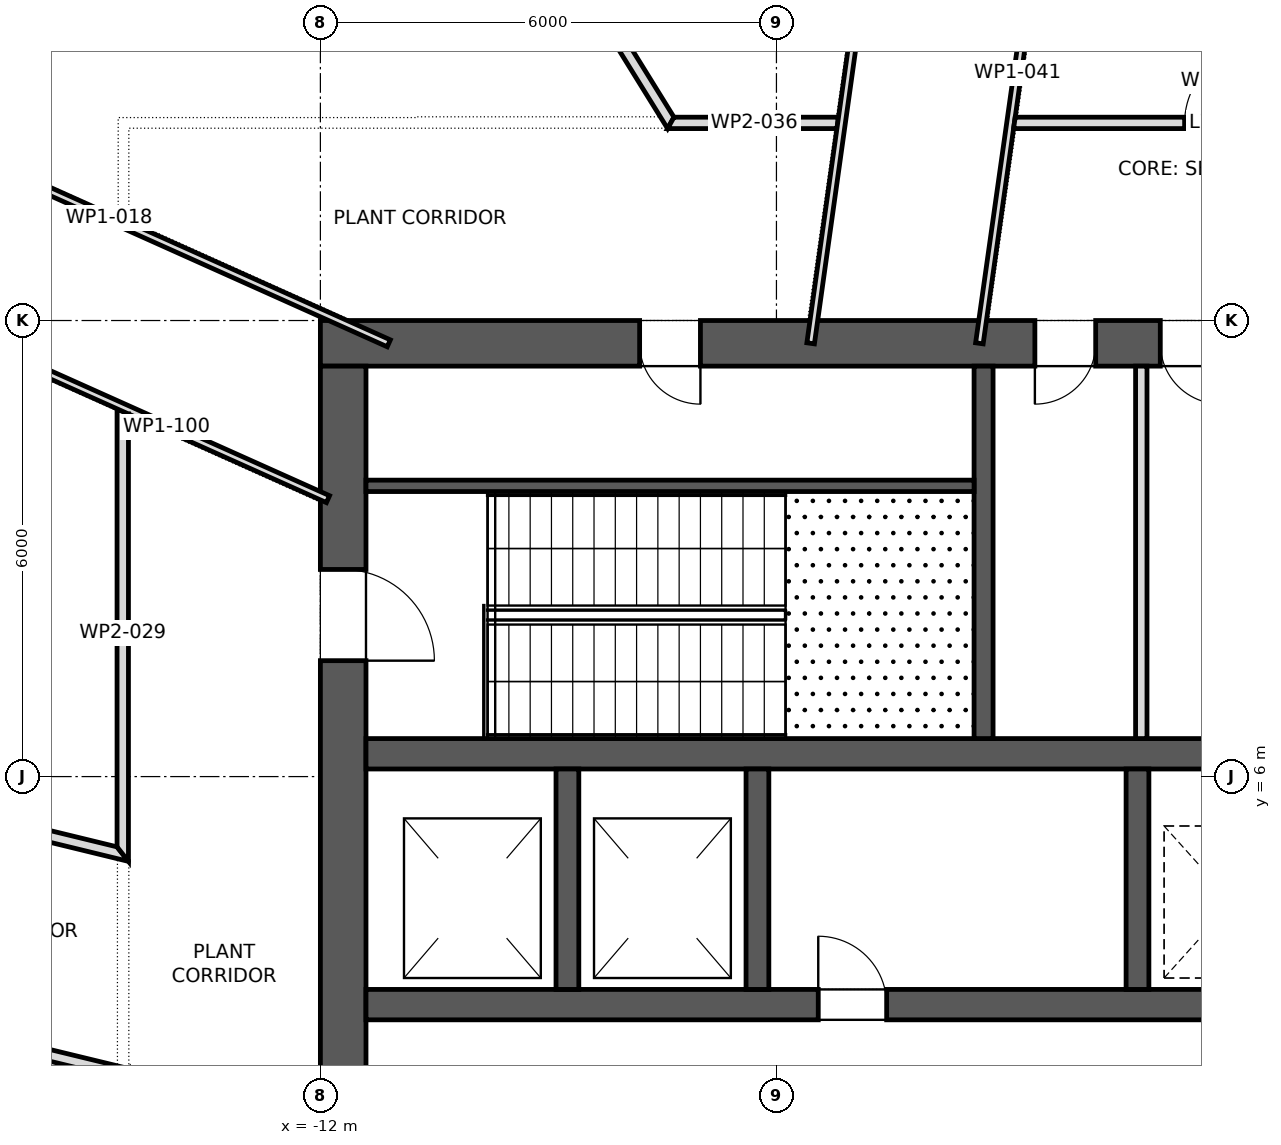
"""IFC4 building model, lengths in metres.
Left out: names, types, materials, properties, quantities, classifications, styles, units other than length and angle.
Written with IfcOpenShell. Run it as: python <this file> out.ifc"""

import sys

from ifc_helpers import new_model, si_unit, direction, frame, frame_2d, origin, place, context, subcontext, project, spatial, polyline, rectangle, outline, extrude, element, fill, save


model = new_model("IFC4")
c1 = context("Model", 3, precision=1e-05, world=origin(), true_north=direction((0.0, 1.0)))
c2 = subcontext(c1, "Body", "Model", "MODEL_VIEW")
j1 = project(units=[si_unit("LENGTHUNIT", "METRE"), si_unit("PLANEANGLEUNIT", "RADIAN")], contexts=[c1])
p1 = place(None, origin())
s1 = spatial("IfcSite", under=j1, at=p1, CompositionType="ELEMENT")
p2 = place(p1, origin())
s2 = spatial("IfcBuilding", under=s1, at=p2, CompositionType="ELEMENT")
p3 = place(p2, frame((0.0, 0.0, 328.3)))
s3 = spatial("IfcBuildingStorey", under=s2, at=p3, CompositionType="ELEMENT", Elevation=328.3)
p4 = place(p3, frame((-12.0, 11.7, 0.0), z_axis=(0.0, 0.0, 1.0), x_axis=(1.0, 0.0, 0.0)))
e1 = element("IfcWall", 1, at=p4, inside=s3, PredefinedType="SHEAR", context=c2, shape_type="SweptSolid", body=[
    extrude(rectangle(XDim=24.0, YDim=0.6, at=frame_2d((12.0, 0.0))), origin(), (0.0, 0.0, 1.0), 5.0),
])
p5 = place(p4, frame((9.4, 0.0, 0.0)))
e2 = element("IfcOpeningElement", 2, at=p5, cuts=e1, PredefinedType="OPENING", context=c2, shape_type="SweptSolid", body=[
    extrude(rectangle(XDim=0.8, YDim=2.1, at=frame_2d((0.4, 1.05))), frame((0.0, 0.312, 0.0), z_axis=(0.0, -1.0, 0.0), x_axis=(1.0, 0.0, 0.0)), (0.0, 0.0, 1.0), 0.624),
])
p6 = place(p4, frame((11.05, 0.0, 0.0)))
e3 = element("IfcOpeningElement", 3, at=p6, cuts=e1, PredefinedType="OPENING", context=c2, shape_type="SweptSolid", body=[
    extrude(rectangle(XDim=0.8, YDim=2.1, at=frame_2d((0.4, 1.05))), frame((0.0, 0.312, 0.0), z_axis=(0.0, -1.0, 0.0), x_axis=(1.0, 0.0, 0.0)), (0.0, 0.0, 1.0), 0.624),
])
p7 = place(p4, frame((4.2, 0.0, 0.0)))
e4 = element("IfcOpeningElement", 4, at=p7, cuts=e1, PredefinedType="OPENING", context=c2, shape_type="SweptSolid", body=[
    extrude(rectangle(XDim=0.8, YDim=2.1, at=frame_2d((0.4, 1.05))), frame((0.0, 0.312, 0.0), z_axis=(0.0, -1.0, 0.0), x_axis=(1.0, 0.0, 0.0)), (0.0, 0.0, 1.0), 0.624),
])
p8 = place(p4, frame((15.85, 0.0, 0.0)))
e5 = element("IfcOpeningElement", 5, at=p8, cuts=e1, PredefinedType="OPENING", context=c2, shape_type="SweptSolid", body=[
    extrude(rectangle(XDim=0.8, YDim=2.1, at=frame_2d((0.4, 1.05))), frame((0.0, 0.312, 0.0), z_axis=(0.0, -1.0, 0.0), x_axis=(1.0, 0.0, 0.0)), (0.0, 0.0, 1.0), 0.624),
])
p9 = place(p3, frame((-11.7, -11.4, 0.0), z_axis=(0.0, 0.0, 1.0), x_axis=(0.0, 1.0, 0.0)))
e6 = element("IfcWall", 6, at=p9, inside=s3, PredefinedType="SHEAR", context=c2, shape_type="SweptSolid", body=[
    extrude(rectangle(XDim=22.8, YDim=0.6, at=frame_2d((11.4, 0.0))), origin(), (0.0, 0.0, 1.0), 5.0),
])
p10 = place(p9, frame((10.2, 0.0, 0.0)))
e7 = element("IfcOpeningElement", 7, at=p10, cuts=e6, PredefinedType="OPENING", context=c2, shape_type="SweptSolid", body=[
    extrude(rectangle(XDim=2.4, YDim=2.1, at=frame_2d((1.2, 1.05))), frame((0.0, 0.312, 0.0), z_axis=(0.0, -1.0, 0.0), x_axis=(1.0, 0.0, 0.0)), (0.0, 0.0, 1.0), 0.624),
])
p11 = place(p9, frame((18.925, 0.0, 0.0)))
e8 = element("IfcOpeningElement", 8, at=p11, cuts=e6, PredefinedType="OPENING", context=c2, shape_type="SweptSolid", body=[
    extrude(rectangle(XDim=1.2, YDim=2.1, at=frame_2d((0.6, 1.05))), frame((0.0, 0.312, 0.0), z_axis=(0.0, -1.0, 0.0), x_axis=(1.0, 0.0, 0.0)), (0.0, 0.0, 1.0), 0.624),
])
p12 = place(p9, frame((2.675, 0.0, 0.0)))
e9 = element("IfcOpeningElement", 9, at=p12, cuts=e6, PredefinedType="OPENING", context=c2, shape_type="SweptSolid", body=[
    extrude(rectangle(XDim=1.2, YDim=2.1, at=frame_2d((0.6, 1.05))), frame((0.0, 0.312, 0.0), z_axis=(0.0, -1.0, 0.0), x_axis=(1.0, 0.0, 0.0)), (0.0, 0.0, 1.0), 0.624),
])
p13 = place(p3, frame((-11.4, 3.0, 0.0), z_axis=(0.0, 0.0, 1.0), x_axis=(1.0, 0.0, 0.0)))
e10 = element("IfcWall", 10, at=p13, inside=s3, PredefinedType="SHEAR", context=c2, shape_type="SweptSolid", body=[
    extrude(rectangle(XDim=22.8, YDim=0.4, at=frame_2d((11.4, 0.0))), origin(), (0.0, 0.0, 1.0), 5.0),
])
p14 = place(p13, frame((18.35, 0.0, 0.0)))
e11 = element("IfcOpeningElement", 11, at=p14, cuts=e10, PredefinedType="OPENING", context=c2, shape_type="SweptSolid", body=[
    extrude(rectangle(XDim=1.1, YDim=2.1, at=frame_2d((0.55, 1.05))), frame((0.0, 0.212, 0.0), z_axis=(0.0, -1.0, 0.0), x_axis=(1.0, 0.0, 0.0)), (0.0, 0.0, 1.0), 0.424),
])
p15 = place(p13, frame((13.788, 0.0, 0.0)))
e12 = element("IfcOpeningElement", 12, at=p15, cuts=e10, PredefinedType="OPENING", context=c2, shape_type="SweptSolid", body=[
    extrude(rectangle(XDim=0.9, YDim=2.1, at=frame_2d((0.45, 1.05))), frame((0.0, 0.212, 0.0), z_axis=(0.0, -1.0, 0.0), x_axis=(1.0, 0.0, 0.0)), (0.0, 0.0, 1.0), 0.424),
])
p16 = place(p13, frame((16.212, 0.0, 0.0)))
e13 = element("IfcOpeningElement", 13, at=p16, cuts=e10, PredefinedType="OPENING", context=c2, shape_type="SweptSolid", body=[
    extrude(rectangle(XDim=0.9, YDim=2.1, at=frame_2d((0.45, 1.05))), frame((0.0, 0.212, 0.0), z_axis=(0.0, -1.0, 0.0), x_axis=(1.0, 0.0, 0.0)), (0.0, 0.0, 1.0), 0.424),
])
p17 = place(p13, frame((5.95, 0.0, 0.0)))
e14 = element("IfcOpeningElement", 14, at=p17, cuts=e10, PredefinedType="OPENING", context=c2, shape_type="SweptSolid", body=[
    extrude(rectangle(XDim=0.9, YDim=2.1, at=frame_2d((0.45, 1.05))), frame((0.0, 0.212, 0.0), z_axis=(0.0, -1.0, 0.0), x_axis=(1.0, 0.0, 0.0)), (0.0, 0.0, 1.0), 0.424),
])
p18 = place(p3, frame((-11.4, 6.3, 0.0), z_axis=(0.0, 0.0, 1.0), x_axis=(1.0, 0.0, 0.0)))
e15 = element("IfcWall", 15, at=p18, inside=s3, PredefinedType="SHEAR", context=c2, shape_type="SweptSolid", body=[
    extrude(rectangle(XDim=22.8, YDim=0.4, at=frame_2d((11.4, 0.0))), origin(), (0.0, 0.0, 1.0), 5.0),
])
p19 = place(p18, frame((20.85, 0.0, 0.0)))
e16 = element("IfcOpeningElement", 16, at=p19, cuts=e15, PredefinedType="OPENING", context=c2, shape_type="SweptSolid", body=[
    extrude(rectangle(XDim=1.1, YDim=2.1, at=frame_2d((0.55, 1.05))), frame((0.0, 0.212, 0.0), z_axis=(0.0, -1.0, 0.0), x_axis=(1.0, 0.0, 0.0)), (0.0, 0.0, 1.0), 0.424),
])
for number, where, z_axis, x_axis in (
    (17, (-8.75, 3.2, 0.0), (0.0, 0.0, 1.0), (0.0, 1.0, 0.0)),
    (18, (-6.25, 3.2, 0.0), (0.0, 0.0, 1.0), (0.0, 1.0, 0.0)),
    (19, (-1.25, 3.2, 0.0), (0.0, 0.0, 1.0), (0.0, 1.0, 0.0)),
):
    element("IfcWall", number, at=place(p3, frame(where, z_axis=z_axis, x_axis=x_axis)), inside=s3, PredefinedType="SHEAR", context=c2, shape_type="SweptSolid", body=[
        extrude(rectangle(XDim=2.9, YDim=0.3, at=frame_2d((1.45, 0.0))), origin(), (0.0, 0.0, 1.0), 5.0),
    ])
p20 = place(p3, frame((-3.275, 6.5, 0.0), z_axis=(0.0, 0.0, 1.0), x_axis=(0.0, 1.0, 0.0)))
e20 = element("IfcWall", 20, at=p20, inside=s3, PredefinedType="SHEAR", context=c2, shape_type="SweptSolid", body=[
    extrude(rectangle(XDim=4.9, YDim=0.25, at=frame_2d((2.45, 0.0))), origin(), (0.0, 0.0, 1.0), 4.65),
])
p21 = place(p3, frame((-11.4, 9.825, 0.0), z_axis=(0.0, 0.0, 1.0), x_axis=(1.0, 0.0, 0.0)))
e21 = element("IfcWall", 21, at=p21, inside=s3, PredefinedType="SHEAR", context=c2, shape_type="SweptSolid", body=[
    extrude(rectangle(XDim=8.0, YDim=0.15, at=frame_2d((4.0, 0.0))), origin(), (0.0, 0.0, 1.0), 4.65),
])
p22 = place(p3, frame((-1.2, 6.5, 0.0), z_axis=(0.0, 0.0, 1.0), x_axis=(0.0, 1.0, 0.0)))
e22 = element("IfcWall", 22, at=p22, inside=s3, PredefinedType="PARTITIONING", context=c2, shape_type="SweptSolid", body=[
    extrude(rectangle(XDim=4.9, YDim=0.15, at=frame_2d((2.45, 0.0))), origin(), (0.0, 0.0, 1.0), 4.65),
])
p23 = place(p3, frame((-24.26, 7.332, 0.0), z_axis=(0.0, 0.0, 1.0), x_axis=(0.971617763283, -0.236556382439, 0.0)))
e23 = element("IfcWall", 23, at=p23, inside=s3, PredefinedType="PARTITIONING", context=c2, shape_type="SweptSolid", body=[
    extrude(outline(polyline([(0.0, -0.075), (1.673, -0.075), (3.346, -0.075), (5.019, -0.075), (6.692, -0.075), (8.365, -0.075), (10.038, -0.075), (9.847, 0.075), (7.915, 0.075), (5.982, 0.075), (4.05, 0.075), (2.118, 0.075), (0.186, 0.075), (0.0, -0.075)])), origin(), (0.0, 0.0, 1.0), 4.65),
])
p24 = place(p23, frame((4.518, 0.0, 0.0)))
e24 = element("IfcOpeningElement", 24, at=p24, cuts=e23, PredefinedType="OPENING", context=c2, shape_type="SweptSolid", body=[
    extrude(rectangle(XDim=1.0, YDim=2.1, at=frame_2d((0.5, 1.05))), frame((0.0, 0.087, 0.0), z_axis=(0.0, -1.0, 0.0), x_axis=(1.0, 0.0, 0.0)), (0.0, 0.0, 1.0), 0.174),
])
p25 = place(p3, frame((-18.488, 15.012, 0.0), z_axis=(0.0, 0.0, 1.0), x_axis=(0.912473613394, -0.409135558048, 0.0)))
e25 = element("IfcWall", 25, at=p25, inside=s3, PredefinedType="PARTITIONING", context=c2, shape_type="SweptSolid", body=[
    extrude(outline(polyline([(0.0, 0.05), (0.0, 0.05), (0.063, -0.05), (1.67, -0.05), (3.277, -0.05), (4.883, -0.05), (6.49, -0.05), (8.096, -0.05), (8.096, 0.05), (6.477, 0.05), (4.858, 0.05), (3.239, 0.05), (1.619, 0.05), (0.0, 0.05)])), origin(), (0.0, 0.0, 1.0), 4.65),
])
p26 = place(p3, frame((-14.543, 2.086, 0.0), z_axis=(0.0, 0.0, 1.0), x_axis=(-0.971811892491, 0.23575759927, 0.0)))
e26 = element("IfcWall", 26, at=p26, inside=s3, PredefinedType="PARTITIONING", context=c2, shape_type="SweptSolid", body=[
    extrude(outline(polyline([(0.0, -0.075), (1.818, -0.075), (3.636, -0.075), (5.454, -0.075), (7.272, -0.075), (9.09, -0.075), (10.908, -0.075), (10.757, 0.075), (8.984, 0.075), (7.21, 0.075), (5.437, 0.075), (3.664, 0.075), (1.891, 0.075), (0.118, 0.075), (0.0, -0.075), (0.0, -0.075)])), origin(), (0.0, 0.0, 1.0), 4.65),
])
p27 = place(p26, frame((4.946, 0.0, 0.0)))
e27 = element("IfcOpeningElement", 27, at=p27, cuts=e26, PredefinedType="OPENING", context=c2, shape_type="SweptSolid", body=[
    extrude(rectangle(XDim=1.0, YDim=2.1, at=frame_2d((0.5, 1.05))), frame((0.0, 0.087, 0.0), z_axis=(0.0, -1.0, 0.0), x_axis=(1.0, 0.0, 0.0)), (0.0, 0.0, 1.0), 0.174),
])
p28 = place(p3, frame((-14.6, 4.885, 0.0), z_axis=(0.0, 0.0, 1.0), x_axis=(0.0, 1.0, 0.0)))
e28 = element("IfcWall", 28, at=p28, inside=s3, PredefinedType="PARTITIONING", context=c2, shape_type="SweptSolid", body=[
    extrude(outline(polyline([(0.0, -0.075), (1.962, -0.075), (3.924, -0.075), (5.886, -0.075), (5.953, 0.074), (5.953, 0.075), (4.032, 0.075), (2.112, 0.075), (0.191, 0.075), (0.191, 0.075), (0.191, 0.075), (0.095, 0.0), (0.0, -0.075)])), origin(), (0.0, 0.0, 1.0), 4.65),
])
p29 = place(p3, frame((-10.599, 19.779, 0.0), z_axis=(0.0, 0.0, 1.0), x_axis=(0.526721747685, -0.850037764171, 0.0)))
e29 = element("IfcWall", 29, at=p29, inside=s3, PredefinedType="PARTITIONING", context=c2, shape_type="SweptSolid", body=[
    extrude(outline(polyline([(0.0, -0.075), (1.534, -0.075), (3.067, -0.075), (4.601, -0.075), (6.135, -0.075), (6.051, 0.075), (4.096, 0.075), (2.141, 0.075), (0.186, 0.075), (0.0, -0.075), (0.0, -0.075)])), origin(), (0.0, 0.0, 1.0), 4.65),
])
p30 = place(p29, frame((2.593, 0.0, 0.0)))
e30 = element("IfcOpeningElement", 30, at=p30, cuts=e29, PredefinedType="OPENING", context=c2, shape_type="SweptSolid", body=[
    extrude(rectangle(XDim=1.0, YDim=2.1, at=frame_2d((0.5, 1.05))), frame((0.0, 0.087, 0.0), z_axis=(0.0, -1.0, 0.0), x_axis=(1.0, 0.0, 0.0)), (0.0, 0.0, 1.0), 0.174),
])
p31 = place(p3, frame((-7.432, 14.6, 0.0), z_axis=(0.0, 0.0, 1.0), x_axis=(1.0, 0.0, 0.0)))
e31 = element("IfcWall", 31, at=p31, inside=s3, PredefinedType="PARTITIONING", context=c2, shape_type="SweptSolid", body=[
    extrude(outline(polyline([(0.0, -0.075), (2.228, -0.075), (2.248, 0.074), (2.248, 0.075), (0.084, 0.075), (0.084, 0.075), (0.084, 0.075), (0.042, 0.0), (0.0, -0.075)])), origin(), (0.0, 0.0, 1.0), 4.65),
])
p32 = place(p3, frame((-5.55, 11.7, 0.0), z_axis=(0.0, 0.0, 1.0), x_axis=(0.138844805467, 0.990314152173, 0.0)))
e32 = element("IfcWall", 32, at=p32, inside=s3, PredefinedType="PARTITIONING", context=c2, shape_type="SweptSolid", body=[
    extrude(rectangle(XDim=9.726, YDim=0.1, at=frame_2d((4.863, 0.0))), origin(), (0.0, 0.0, 1.0), 4.65),
])
p33 = place(p3, frame((-3.33, 11.7, 0.0), z_axis=(0.0, 0.0, 1.0), x_axis=(0.140005886866, 0.990150671182, 0.0)))
e33 = element("IfcWall", 33, at=p33, inside=s3, PredefinedType="PARTITIONING", context=c2, shape_type="SweptSolid", body=[
    extrude(rectangle(XDim=7.197, YDim=0.1, at=frame_2d((3.598, 0.0))), origin(), (0.0, 0.0, 1.0), 4.65),
])
p34 = place(p3, frame((-2.88, 14.6, 0.0), z_axis=(0.0, 0.0, 1.0), x_axis=(1.0, 0.0, 0.0)))
e34 = element("IfcWall", 34, at=p34, inside=s3, PredefinedType="PARTITIONING", context=c2, shape_type="SweptSolid", body=[
    extrude(outline(polyline([(0.0, -0.075), (1.862, -0.075), (3.724, -0.075), (5.587, -0.075), (5.53, 0.0), (5.473, 0.075), (5.473, 0.075), (5.473, 0.075), (3.656, 0.075), (1.838, 0.075), (0.021, 0.075), (0.0, -0.073), (0.0, -0.075)])), origin(), (0.0, 0.0, 1.0), 4.65),
])
p35 = place(p34, frame((2.25, 0.0, 0.0)))
e35 = element("IfcOpeningElement", 35, at=p35, cuts=e34, PredefinedType="OPENING", context=c2, shape_type="SweptSolid", body=[
    extrude(rectangle(XDim=1.0, YDim=2.1, at=frame_2d((0.5, 1.05))), frame((0.0, 0.087, 0.0), z_axis=(0.0, -1.0, 0.0), x_axis=(1.0, 0.0, 0.0)), (0.0, 0.0, 1.0), 0.174),
])
p36 = place(p3, frame((-16.15, 11.553, 0.0), z_axis=(0.0, 0.0, 1.0), x_axis=(0.912638165026, -0.408768369296, 0.0)))
e36 = element("IfcWall", 36, at=p36, inside=s3, PredefinedType="PARTITIONING", context=c2, shape_type="SweptSolid", body=[
    extrude(outline(polyline([(0.0, -0.05), (1.799, -0.05), (1.802, -0.049), (1.803, -0.05), (3.23, -0.05), (4.657, -0.05), (4.657, 0.05), (3.104, 0.05), (1.552, 0.05), (0.0, 0.05), (0.0, -0.05)])), origin(), (0.0, 0.0, 1.0), 4.65),
])
p37 = place(p11, frame((1.2, 0.0, 0.0), z_axis=(0.0, 0.0, 1.0), x_axis=(-1.0, 0.0, 0.0)))
e37 = element("IfcDoor", 37, at=p37, inside=s3, OperationType="SINGLE_SWING_LEFT", PredefinedType="DOOR", context=c2, shape_type="SweptSolid", body=[
    extrude(rectangle(XDim=1.2, YDim=2.1, at=frame_2d((0.6, 1.05))), frame((0.0, 0.025, 0.0), z_axis=(0.0, -1.0, 0.0), x_axis=(1.0, 0.0, 0.0)), (0.0, 0.0, 1.0), 0.05),
])
fill(e8, e37)
p38 = place(p5, frame((0.8, 0.0, 0.0), z_axis=(0.0, 0.0, 1.0), x_axis=(-1.0, 0.0, 0.0)))
e38 = element("IfcDoor", 38, at=p38, inside=s3, OperationType="SINGLE_SWING_LEFT", PredefinedType="DOOR", context=c2, shape_type="SweptSolid", body=[
    extrude(rectangle(XDim=0.8, YDim=2.1, at=frame_2d((0.4, 1.05))), frame((0.0, 0.025, 0.0), z_axis=(0.0, -1.0, 0.0), x_axis=(1.0, 0.0, 0.0)), (0.0, 0.0, 1.0), 0.05),
])
fill(e2, e38)
p39 = place(p6, frame((0.8, 0.0, 0.0), z_axis=(0.0, 0.0, 1.0), x_axis=(-1.0, 0.0, 0.0)))
e39 = element("IfcDoor", 39, at=p39, inside=s3, OperationType="SINGLE_SWING_RIGHT", PredefinedType="DOOR", context=c2, shape_type="SweptSolid", body=[
    extrude(rectangle(XDim=0.8, YDim=2.1, at=frame_2d((0.4, 1.05))), frame((0.0, 0.025, 0.0), z_axis=(0.0, -1.0, 0.0), x_axis=(1.0, 0.0, 0.0)), (0.0, 0.0, 1.0), 0.05),
])
fill(e3, e39)
p40 = place(p7, frame((0.8, 0.0, 0.0), z_axis=(0.0, 0.0, 1.0), x_axis=(-1.0, 0.0, 0.0)))
e40 = element("IfcDoor", 40, at=p40, inside=s3, OperationType="SINGLE_SWING_RIGHT", PredefinedType="DOOR", context=c2, shape_type="SweptSolid", body=[
    extrude(rectangle(XDim=0.8, YDim=2.1, at=frame_2d((0.4, 1.05))), frame((0.0, 0.025, 0.0), z_axis=(0.0, -1.0, 0.0), x_axis=(1.0, 0.0, 0.0)), (0.0, 0.0, 1.0), 0.05),
])
fill(e4, e40)
p41 = place(p17, origin())
e41 = element("IfcDoor", 41, at=p41, inside=s3, OperationType="SINGLE_SWING_RIGHT", PredefinedType="DOOR", context=c2, shape_type="SweptSolid", body=[
    extrude(rectangle(XDim=0.9, YDim=2.1, at=frame_2d((0.45, 1.05))), frame((0.0, 0.025, 0.0), z_axis=(0.0, -1.0, 0.0), x_axis=(1.0, 0.0, 0.0)), (0.0, 0.0, 1.0), 0.05),
])
fill(e14, e41)
p42 = place(p35, origin())
e42 = element("IfcDoor", 42, at=p42, inside=s3, OperationType="SINGLE_SWING_LEFT", PredefinedType="DOOR", context=c2, shape_type="SweptSolid", body=[
    extrude(rectangle(XDim=1.0, YDim=2.1, at=frame_2d((0.5, 1.05))), frame((0.0, 0.025, 0.0), z_axis=(0.0, -1.0, 0.0), x_axis=(1.0, 0.0, 0.0)), (0.0, 0.0, 1.0), 0.05),
])
fill(e35, e42)
save(model, sys.argv[1])
